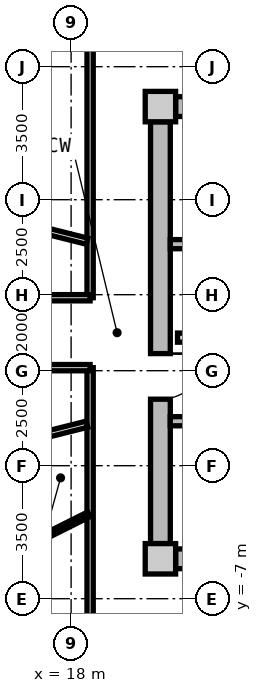
"""IFC4 building model, lengths in metres.
Left out: names, types, materials, properties, quantities, classifications, styles, units other than length and angle.
Written with IfcOpenShell. Run it as: python <this file> out.ifc"""

import sys

from ifc_helpers import new_model, si_unit, direction, frame, frame_2d, origin, origin_2d, place, context, subcontext, project, spatial, rectangle, extrude, source, transform, mapped, element, fill, save


model = new_model("IFC4")
c1 = context("Model", 3, precision=1e-05, world=origin(), true_north=direction((0.0, 1.0)))
c2 = subcontext(c1, "Body", "Model", "MODEL_VIEW")
j1 = project(units=[si_unit("LENGTHUNIT", "METRE"), si_unit("PLANEANGLEUNIT", "RADIAN")], contexts=[c1])
p1 = place(None, origin())
s1 = spatial("IfcSite", under=j1, at=p1, CompositionType="ELEMENT")
p2 = place(p1, origin())
s2 = spatial("IfcBuilding", under=s1, at=p2, CompositionType="ELEMENT")
p3 = place(p2, frame((0.0, 0.0, 226.1)))
s3 = spatial("IfcBuildingStorey", under=s2, at=p3, CompositionType="ELEMENT", Elevation=226.1)
m1 = source(origin(), c2, "Body", "SweptSolid", [
    extrude(rectangle(XDim=0.8, YDim=0.8, at=origin_2d()), origin(), (0.0, 0.0, 1.0), 3.05),
])
for number, where, z_axis, x_axis in (
    (1, (20.35, -5.95, 0.0), (0.0, 0.0, 1.0), (1.0, 0.0, 0.0)),
    (2, (20.35, 5.95, 0.0), (0.0, 0.0, 1.0), (1.0, 0.0, 0.0)),
):
    element("IfcColumn", number, at=place(p3, frame(where, z_axis=z_axis, x_axis=x_axis)), inside=s3, PredefinedType="COLUMN", context=c2, shape_type="MappedRepresentation", body=[
        mapped(m1, transform((0.0, 0.0, 0.0), x_axis=(1.0, 0.0, 0.0), y_axis=(0.0, 1.0, 0.0), z_axis=(0.0, 0.0, 1.0), scale=1.0)),
    ])
m2 = source(origin(), c2, "Body", "SweptSolid", [
    extrude(rectangle(XDim=14.5, YDim=0.52, at=frame_2d((7.25, 0.0))), origin(), (0.0, 0.0, 1.0), 2.76),
])
for number, where, z_axis, x_axis in (
    (3, (20.75, 5.95, 0.0), (0.0, 0.0, 1.0), (1.0, 0.0, 0.0)),
    (4, (35.25, -5.95, 0.0), (0.0, 0.0, 1.0), (-1.0, 0.0, 0.0)),
):
    element("IfcWall", number, at=place(p3, frame(where, z_axis=z_axis, x_axis=x_axis)), inside=s3, PredefinedType="SHEAR", context=c2, shape_type="MappedRepresentation", body=[
        mapped(m2, transform((0.0, 0.0, 0.0), x_axis=(1.0, 0.0, 0.0), y_axis=(0.0, 1.0, 0.0), z_axis=(0.0, 0.0, 1.0), scale=1.0)),
    ])
m3 = source(origin(), c2, "Body", "SweptSolid", [
    extrude(rectangle(XDim=11.1, YDim=0.52, at=frame_2d((5.55, 0.0))), origin(), (0.0, 0.0, 1.0), 2.76),
])
p4 = place(p3, frame((20.35, -5.55, 0.0), z_axis=(0.0, 0.0, 1.0), x_axis=(0.0, 1.0, 0.0)))
e5 = element("IfcWall", 5, at=p4, inside=s3, PredefinedType="SHEAR", context=c2, shape_type="MappedRepresentation", body=[
    mapped(m3, transform((0.0, 0.0, 0.0), x_axis=(1.0, 0.0, 0.0), y_axis=(0.0, 1.0, 0.0), z_axis=(0.0, 0.0, 1.0), scale=1.0)),
])
p5 = place(p4, frame((3.8, 0.0, 0.0)))
e6 = element("IfcOpeningElement", 6, at=p5, cuts=e5, PredefinedType="OPENING", context=c2, shape_type="SweptSolid", body=[
    extrude(rectangle(XDim=1.2, YDim=2.15, at=frame_2d((0.6, 1.075))), frame((0.0, 0.27, 0.0), z_axis=(0.0, -1.0, 0.0), x_axis=(1.0, 0.0, 0.0)), (0.0, 0.0, 1.0), 0.54),
])
m4 = source(origin(), c2, "Body", "SweptSolid", [
    extrude(rectangle(XDim=7.93, YDim=0.24, at=frame_2d((3.965, 0.0))), origin(), (0.0, 0.0, 1.0), 2.76),
])
p6 = place(p3, frame((20.61, 2.33, 0.0), z_axis=(0.0, 0.0, 1.0), x_axis=(1.0, 0.0, 0.0)))
e7 = element("IfcWall", 7, at=p6, inside=s3, PredefinedType="PARTITIONING", context=c2, shape_type="MappedRepresentation", body=[
    mapped(m4, transform((0.0, 0.0, 0.0), x_axis=(1.0, 0.0, 0.0), y_axis=(0.0, 1.0, 0.0), z_axis=(0.0, 0.0, 1.0), scale=1.0)),
])
p7 = place(p3, frame((20.61, -2.33, 0.0), z_axis=(0.0, 0.0, 1.0), x_axis=(1.0, 0.0, 0.0)))
e8 = element("IfcWall", 8, at=p7, inside=s3, PredefinedType="PARTITIONING", context=c2, shape_type="MappedRepresentation", body=[
    mapped(m4, transform((0.0, 0.0, 0.0), x_axis=(1.0, 0.0, 0.0), y_axis=(0.0, 1.0, 0.0), z_axis=(0.0, 0.0, 1.0), scale=1.0)),
])
p8 = place(p7, frame((1.05, 0.0, 0.0)))
e9 = element("IfcOpeningElement", 9, at=p8, cuts=e8, PredefinedType="OPENING", context=c2, shape_type="SweptSolid", body=[
    extrude(rectangle(XDim=1.1, YDim=2.15, at=frame_2d((0.55, 1.075))), frame((0.0, 0.13, 0.0), z_axis=(0.0, -1.0, 0.0), x_axis=(1.0, 0.0, 0.0)), (0.0, 0.0, 1.0), 0.26),
])
m5 = source(origin(), c2, "Body", "SweptSolid", [
    extrude(rectangle(XDim=7.62, YDim=0.24, at=frame_2d((3.81, 0.0))), origin(), (0.0, 0.0, 1.0), 2.745),
])
p9 = place(p3, frame((20.8, -0.13, 0.0), z_axis=(0.0, 0.0, 1.0), x_axis=(1.0, 0.0, 0.0)))
e10 = element("IfcWall", 10, at=p9, inside=s3, PredefinedType="PARTITIONING", context=c2, shape_type="MappedRepresentation", body=[
    mapped(m5, transform((0.0, 0.0, 0.0), x_axis=(1.0, 0.0, 0.0), y_axis=(0.0, 1.0, 0.0), z_axis=(0.0, 0.0, 1.0), scale=1.0)),
])
p10 = place(p9, frame((6.22, 0.0, 0.0)))
e11 = element("IfcOpeningElement", 11, at=p10, cuts=e10, PredefinedType="OPENING", context=c2, shape_type="SweptSolid", body=[
    extrude(rectangle(XDim=1.0, YDim=2.1, at=frame_2d((0.5, 1.05))), frame((0.0, 0.13, 0.0), z_axis=(0.0, -1.0, 0.0), x_axis=(1.0, 0.0, 0.0)), (0.0, 0.0, 1.0), 0.26),
])
p11 = place(p9, frame((2.4, 0.0, 0.0)))
e12 = element("IfcOpeningElement", 12, at=p11, cuts=e10, PredefinedType="OPENING", context=c2, shape_type="SweptSolid", body=[
    extrude(rectangle(XDim=1.0, YDim=2.1, at=frame_2d((0.5, 1.05))), frame((0.0, 0.13, 0.0), z_axis=(0.0, -1.0, 0.0), x_axis=(1.0, 0.0, 0.0)), (0.0, 0.0, 1.0), 0.26),
])
m6 = source(origin(), c2, "Body", "SweptSolid", [
    extrude(rectangle(XDim=6.88, YDim=0.165, at=frame_2d((3.44, 0.0))), origin(), (0.0, 0.0, 1.0), 2.745),
])
for number, where, z_axis, x_axis in (
    (13, (18.5, -7.8, 0.0), (0.0, 0.0, 1.0), (0.0, 1.0, 0.0)),
    (14, (18.5, 0.92, 0.0), (0.0, 0.0, 1.0), (0.0, 1.0, 0.0)),
):
    element("IfcWall", number, at=place(p3, frame(where, z_axis=z_axis, x_axis=x_axis)), inside=s3, PredefinedType="PARTITIONING", context=c2, shape_type="MappedRepresentation", body=[
        mapped(m6, transform((0.0, 0.0, 0.0), x_axis=(1.0, 0.0, 0.0), y_axis=(0.0, 1.0, 0.0), z_axis=(0.0, 0.0, 1.0), scale=1.0)),
    ])
m7 = source(origin(), c2, "Body", "SweptSolid", [
    extrude(rectangle(XDim=6.157, YDim=0.165, at=frame_2d((3.079, 0.0))), origin(), (0.0, 0.0, 1.0), 2.345),
])
for number, where, z_axis, x_axis in (
    (15, (18.42, 2.407, 0.0), (0.0, 0.0, 1.0), (-0.97, 0.244, 0.0)),
    (16, (18.42, -2.407, 0.0), (0.0, 0.0, 1.0), (-0.97, -0.244, 0.0)),
):
    element("IfcWall", number, at=place(p3, frame(where, z_axis=z_axis, x_axis=x_axis)), inside=s3, PredefinedType="PARTITIONING", context=c2, shape_type="MappedRepresentation", body=[
        mapped(m7, transform((0.0, 0.0, 0.0), x_axis=(1.0, 0.0, 0.0), y_axis=(0.0, 1.0, 0.0), z_axis=(0.0, 0.0, 1.0), scale=1.0)),
    ])
m8 = source(origin(), c2, "Body", "SweptSolid", [
    extrude(rectangle(XDim=1.638, YDim=0.14, at=frame_2d((0.819, 0.0))), origin(), (0.0, 0.0, 1.0), 2.745),
])
p12 = place(p3, frame((18.47, -4.778, 0.0), z_axis=(0.0, 0.0, 1.0), x_axis=(-0.893919977945, -0.448226586707, 0.0)))
e17 = element("IfcWall", 17, at=p12, inside=s3, PredefinedType="PARTITIONING", context=c2, shape_type="MappedRepresentation", body=[
    mapped(m8, transform((0.0, 0.0, 0.0), x_axis=(1.0, 0.0, 0.0), y_axis=(0.0, 1.0, 0.0), z_axis=(0.0, 0.0, 1.0), scale=1.0)),
])
m9 = source(origin(), c2, "Body", "SweptSolid", [
    extrude(rectangle(XDim=3.45, YDim=0.115, at=frame_2d((1.725, 0.0))), origin(), (0.0, 0.0, 1.0), 2.745),
])
p13 = place(p3, frame((16.475, -6.275, 0.0), z_axis=(0.0, 0.0, 1.0), x_axis=(0.483659007882, -0.875256513312, 0.0)))
e18 = element("IfcWall", 18, at=p13, inside=s3, PredefinedType="PARTITIONING", context=c2, shape_type="MappedRepresentation", body=[
    mapped(m9, transform((0.0, 0.0, 0.0), x_axis=(1.0, 0.0, 0.0), y_axis=(0.0, 1.0, 0.0), z_axis=(0.0, 0.0, 1.0), scale=1.0)),
])
p14 = place(p13, frame((1.25, 0.0, 0.0)))
e19 = element("IfcOpeningElement", 19, at=p14, cuts=e18, PredefinedType="OPENING", context=c2, shape_type="SweptSolid", body=[
    extrude(rectangle(XDim=0.95, YDim=2.1, at=frame_2d((0.475, 1.05))), frame((0.0, 0.067, 0.0), z_axis=(0.0, -1.0, 0.0), x_axis=(1.0, 0.0, 0.0)), (0.0, 0.0, 1.0), 0.135),
])
m10 = source(origin(), c2, "Body", "SweptSolid", [
    extrude(rectangle(XDim=37.0, YDim=0.165, at=frame_2d((18.5, 0.0))), origin(), (0.0, 0.0, 1.0), 2.745),
])
p15 = place(p3, frame((-18.5, -0.92, 0.0), z_axis=(0.0, 0.0, 1.0), x_axis=(1.0, 0.0, 0.0)))
e20 = element("IfcWall", 20, at=p15, inside=s3, PredefinedType="PARTITIONING", context=c2, shape_type="MappedRepresentation", body=[
    mapped(m10, transform((0.0, 0.0, 0.0), x_axis=(1.0, 0.0, 0.0), y_axis=(0.0, 1.0, 0.0), z_axis=(0.0, 0.0, 1.0), scale=1.0)),
])
p16 = place(p15, frame((2.662, 0.0, 0.0)))
e21 = element("IfcOpeningElement", 21, at=p16, cuts=e20, PredefinedType="OPENING", context=c2, shape_type="SweptSolid", body=[
    extrude(rectangle(XDim=0.95, YDim=2.1, at=frame_2d((0.475, 1.05))), frame((0.0, 0.093, 0.0), z_axis=(0.0, -1.0, 0.0), x_axis=(1.0, 0.0, 0.0)), (0.0, 0.0, 1.0), 0.185),
])
p17 = place(p15, frame((33.388, 0.0, 0.0)))
e22 = element("IfcOpeningElement", 22, at=p17, cuts=e20, PredefinedType="OPENING", context=c2, shape_type="SweptSolid", body=[
    extrude(rectangle(XDim=0.95, YDim=2.1, at=frame_2d((0.475, 1.05))), frame((0.0, 0.093, 0.0), z_axis=(0.0, -1.0, 0.0), x_axis=(1.0, 0.0, 0.0)), (0.0, 0.0, 1.0), 0.185),
])
p18 = place(p15, frame((12.71, 0.0, 0.0)))
e23 = element("IfcOpeningElement", 23, at=p18, cuts=e20, PredefinedType="OPENING", context=c2, shape_type="SweptSolid", body=[
    extrude(rectangle(XDim=1.25, YDim=2.2, at=frame_2d((0.625, 1.1))), frame((0.0, 0.093, 0.0), z_axis=(0.0, -1.0, 0.0), x_axis=(1.0, 0.0, 0.0)), (0.0, 0.0, 1.0), 0.185),
])
p19 = place(p15, frame((20.875, 0.0, 0.0)))
e24 = element("IfcOpeningElement", 24, at=p19, cuts=e20, PredefinedType="OPENING", context=c2, shape_type="SweptSolid", body=[
    extrude(rectangle(XDim=1.25, YDim=2.2, at=frame_2d((0.625, 1.1))), frame((0.0, 0.093, 0.0), z_axis=(0.0, -1.0, 0.0), x_axis=(1.0, 0.0, 0.0)), (0.0, 0.0, 1.0), 0.185),
])
p20 = place(p15, frame((26.675, 0.0, 0.0)))
e25 = element("IfcOpeningElement", 25, at=p20, cuts=e20, PredefinedType="OPENING", context=c2, shape_type="SweptSolid", body=[
    extrude(rectangle(XDim=1.25, YDim=2.2, at=frame_2d((0.625, 1.1))), frame((0.0, 0.093, 0.0), z_axis=(0.0, -1.0, 0.0), x_axis=(1.0, 0.0, 0.0)), (0.0, 0.0, 1.0), 0.185),
])
p21 = place(p3, frame((-18.5, 0.92, 0.0), z_axis=(0.0, 0.0, 1.0), x_axis=(1.0, 0.0, 0.0)))
e26 = element("IfcWall", 26, at=p21, inside=s3, PredefinedType="PARTITIONING", context=c2, shape_type="MappedRepresentation", body=[
    mapped(m10, transform((0.0, 0.0, 0.0), x_axis=(1.0, 0.0, 0.0), y_axis=(0.0, 1.0, 0.0), z_axis=(0.0, 0.0, 1.0), scale=1.0)),
])
p22 = place(p21, frame((2.662, 0.0, 0.0)))
e27 = element("IfcOpeningElement", 27, at=p22, cuts=e26, PredefinedType="OPENING", context=c2, shape_type="SweptSolid", body=[
    extrude(rectangle(XDim=0.95, YDim=2.1, at=frame_2d((0.475, 1.05))), frame((0.0, 0.093, 0.0), z_axis=(0.0, -1.0, 0.0), x_axis=(1.0, 0.0, 0.0)), (0.0, 0.0, 1.0), 0.185),
])
p23 = place(p21, frame((33.388, 0.0, 0.0)))
e28 = element("IfcOpeningElement", 28, at=p23, cuts=e26, PredefinedType="OPENING", context=c2, shape_type="SweptSolid", body=[
    extrude(rectangle(XDim=0.95, YDim=2.1, at=frame_2d((0.475, 1.05))), frame((0.0, 0.093, 0.0), z_axis=(0.0, -1.0, 0.0), x_axis=(1.0, 0.0, 0.0)), (0.0, 0.0, 1.0), 0.185),
])
p24 = place(p21, frame((7.64, 0.0, 0.0)))
e29 = element("IfcOpeningElement", 29, at=p24, cuts=e26, PredefinedType="OPENING", context=c2, shape_type="SweptSolid", body=[
    extrude(rectangle(XDim=0.92, YDim=2.1, at=frame_2d((0.46, 1.05))), frame((0.0, 0.093, 0.0), z_axis=(0.0, -1.0, 0.0), x_axis=(1.0, 0.0, 0.0)), (0.0, 0.0, 1.0), 0.185),
])
p25 = place(p21, frame((13.275, 0.0, 0.0)))
e30 = element("IfcOpeningElement", 30, at=p25, cuts=e26, PredefinedType="OPENING", context=c2, shape_type="SweptSolid", body=[
    extrude(rectangle(XDim=1.25, YDim=2.2, at=frame_2d((0.625, 1.1))), frame((0.0, 0.093, 0.0), z_axis=(0.0, -1.0, 0.0), x_axis=(1.0, 0.0, 0.0)), (0.0, 0.0, 1.0), 0.185),
])
p26 = place(p21, frame((20.875, 0.0, 0.0)))
e31 = element("IfcOpeningElement", 31, at=p26, cuts=e26, PredefinedType="OPENING", context=c2, shape_type="SweptSolid", body=[
    extrude(rectangle(XDim=1.25, YDim=2.2, at=frame_2d((0.625, 1.1))), frame((0.0, 0.093, 0.0), z_axis=(0.0, -1.0, 0.0), x_axis=(1.0, 0.0, 0.0)), (0.0, 0.0, 1.0), 0.185),
])
p27 = place(p21, frame((26.675, 0.0, 0.0)))
e32 = element("IfcOpeningElement", 32, at=p27, cuts=e26, PredefinedType="OPENING", context=c2, shape_type="SweptSolid", body=[
    extrude(rectangle(XDim=1.25, YDim=2.2, at=frame_2d((0.625, 1.1))), frame((0.0, 0.093, 0.0), z_axis=(0.0, -1.0, 0.0), x_axis=(1.0, 0.0, 0.0)), (0.0, 0.0, 1.0), 0.185),
])
m11 = source(origin(), c2, "Body", "SweptSolid", [
    extrude(rectangle(XDim=1.2, YDim=2.15, at=frame_2d((0.6, 1.075))), frame((0.0, 0.025, 0.0), z_axis=(0.0, -1.0, 0.0), x_axis=(1.0, 0.0, 0.0)), (0.0, 0.0, 1.0), 0.05),
])
p28 = place(p5, frame((1.2, 0.0, 0.0), z_axis=(0.0, 0.0, 1.0), x_axis=(-1.0, 0.0, 0.0)))
e33 = element("IfcDoor", 33, at=p28, inside=s3, OperationType="SINGLE_SWING_LEFT", PredefinedType="DOOR", context=c2, shape_type="MappedRepresentation", body=[
    mapped(m11, transform((0.0, 0.0, 0.0), x_axis=(1.0, 0.0, 0.0), y_axis=(0.0, 1.0, 0.0), z_axis=(0.0, 0.0, 1.0), scale=1.0)),
])
fill(e6, e33)
m12 = source(origin(), c2, "Body", "SweptSolid", [
    extrude(rectangle(XDim=0.95, YDim=2.1, at=frame_2d((0.475, 1.05))), frame((0.0, 0.025, 0.0), z_axis=(0.0, -1.0, 0.0), x_axis=(1.0, 0.0, 0.0)), (0.0, 0.0, 1.0), 0.05),
])
p29 = place(p14, frame((0.95, 0.0, 0.0), z_axis=(0.0, 0.0, 1.0), x_axis=(-1.0, 0.0, 0.0)))
e34 = element("IfcDoor", 34, at=p29, inside=s3, OperationType="SINGLE_SWING_LEFT", PredefinedType="DOOR", context=c2, shape_type="MappedRepresentation", body=[
    mapped(m12, transform((0.0, 0.0, 0.0), x_axis=(1.0, 0.0, 0.0), y_axis=(0.0, 1.0, 0.0), z_axis=(0.0, 0.0, 1.0), scale=1.0)),
])
fill(e19, e34)
save(model, sys.argv[1])
